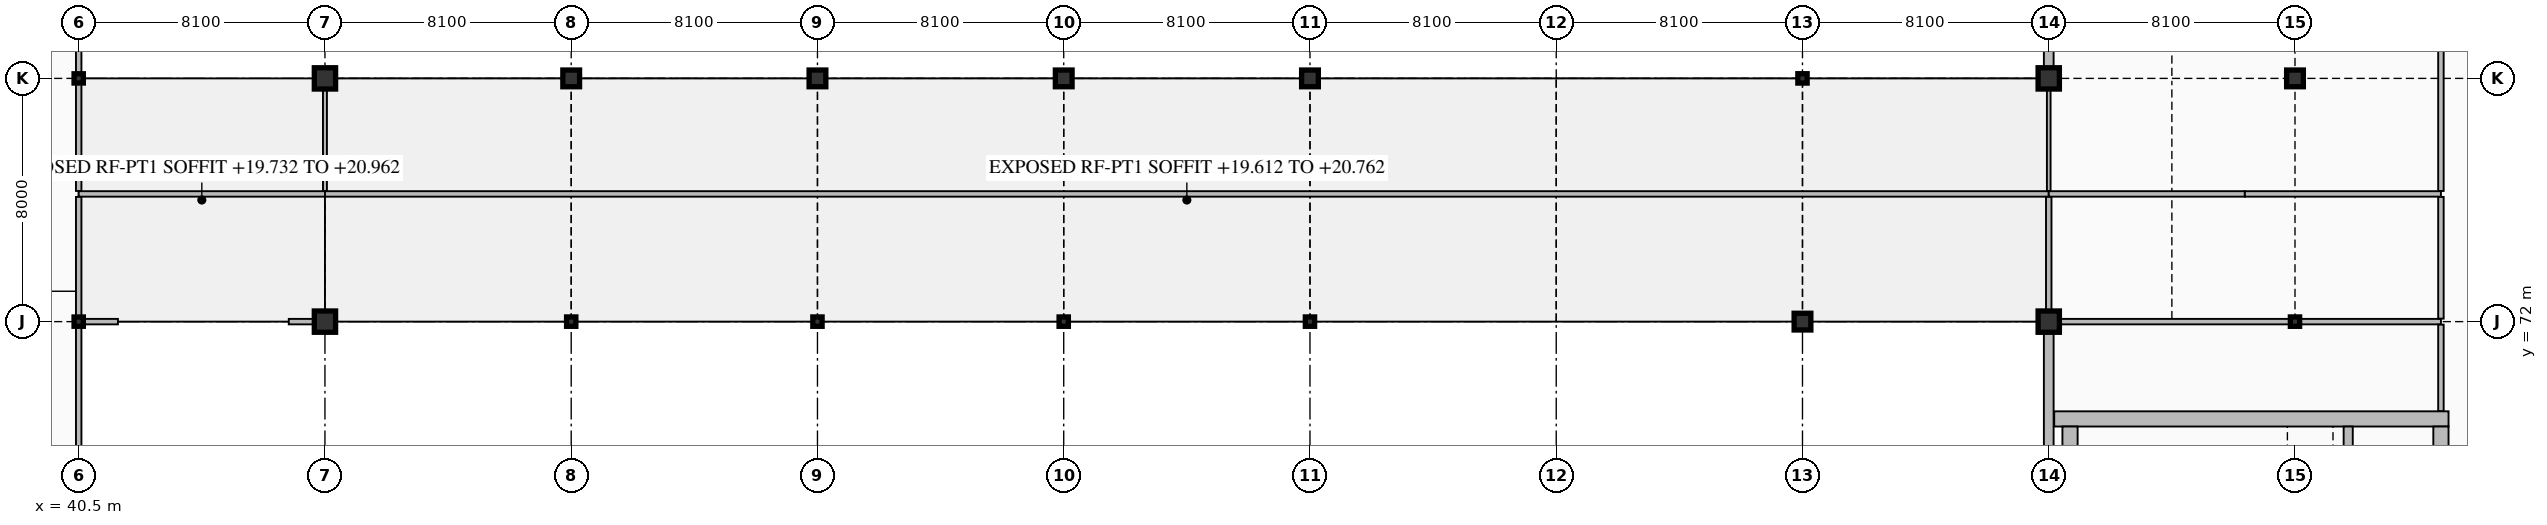
"""IFC4 building model, lengths in metres.
Left out: names, types, materials, properties, quantities, classifications, styles, units other than length and angle.
Written with IfcOpenShell. Run it as: python <this file> out.ifc"""

import sys

from ifc_helpers import new_model, si_unit, direction, frame, frame_2d, origin, origin_2d, place, context, subcontext, project, spatial, rectangle, hollow_rectangle, i_section, extrude, element, fill, save


model = new_model("IFC4")
c1 = context("Model", 3, precision=1e-05, world=origin(), true_north=direction((0.0, 1.0)))
c2 = subcontext(c1, "Body", "Model", "MODEL_VIEW")
j1 = project(units=[si_unit("LENGTHUNIT", "METRE"), si_unit("PLANEANGLEUNIT", "RADIAN")], contexts=[c1])
p1 = place(None, origin())
s1 = spatial("IfcSite", under=j1, at=p1, CompositionType="ELEMENT")
p2 = place(p1, origin())
s2 = spatial("IfcBuilding", under=s1, at=p2, CompositionType="ELEMENT")
p3 = place(p2, frame((0.0, 0.0, 14.7)))
s3 = spatial("IfcBuildingStorey", under=s2, at=p3, CompositionType="ELEMENT", Elevation=14.7)
p4 = place(p3, frame((105.48, 68.8, 0.0), z_axis=(0.0, 0.0, 1.0), x_axis=(1.0, 0.0, 0.0)))
e1 = element("IfcWall", 1, at=p4, inside=s3, PredefinedType="SHEAR", context=c2, shape_type="SweptSolid", body=[
    extrude(rectangle(XDim=12.97, YDim=0.5, at=frame_2d((6.485, 0.0))), origin(), (0.0, 0.0, 1.0), 5.1),
])
for number, where, z_axis, x_axis in (
    (2, (106.0, 60.65, 0.0), (0.0, 0.0, 1.0), (0.0, 1.0, 0.0)),
    (3, (118.2, 60.65, 0.0), (0.0, 0.0, 1.0), (0.0, 1.0, 0.0)),
):
    element("IfcWall", number, at=place(p3, frame(where, z_axis=z_axis, x_axis=x_axis)), inside=s3, PredefinedType="SHEAR", context=c2, shape_type="SweptSolid", body=[
        extrude(rectangle(XDim=7.9, YDim=0.5, at=frame_2d((3.95, 0.0))), origin(), (0.0, 0.0, 1.0), 5.1),
    ])
p5 = place(p3, frame((115.15, 60.65, 0.0), z_axis=(0.0, 0.0, 1.0), x_axis=(0.0, 1.0, 0.0)))
e4 = element("IfcWall", 4, at=p5, inside=s3, PredefinedType="SHEAR", context=c2, shape_type="SweptSolid", body=[
    extrude(rectangle(XDim=7.9, YDim=0.3, at=frame_2d((3.95, 0.0))), origin(), (0.0, 0.0, 1.0), 5.1),
])
for number, where, z_axis, x_axis in (
    (5, (40.5, 72.0, 0.0), (0.0, 0.0, 1.0), (1.0, 0.0, 0.0)),
    (6, (40.5, 80.0, 0.0), (0.0, 0.0, 1.0), (1.0, 0.0, 0.0)),
):
    element("IfcColumn", number, at=place(p3, frame(where, z_axis=z_axis, x_axis=x_axis)), inside=s3, PredefinedType="COLUMN", context=c2, shape_type="SweptSolid", body=[
        extrude(hollow_rectangle(XDim=0.305, YDim=0.305, WallThickness=0.016, InnerFilletRadius=0.016, OuterFilletRadius=0.032, at=origin_2d()), origin(), (0.0, 0.0, 1.0), 5.1),
    ])
for number, where, z_axis, x_axis in (
    (7, (48.6, 72.0, 0.0), (0.0, 0.0, 1.0), (1.0, 0.0, 0.0)),
    (8, (48.6, 80.0, 0.0), (0.0, 0.0, 1.0), (1.0, 0.0, 0.0)),
):
    element("IfcColumn", number, at=place(p3, frame(where, z_axis=z_axis, x_axis=x_axis)), inside=s3, PredefinedType="COLUMN", context=c2, shape_type="SweptSolid", body=[
        extrude(rectangle(XDim=0.7, YDim=0.7, at=origin_2d()), origin(), (0.0, 0.0, 1.0), 4.84),
    ])
p6 = place(p3, frame((56.7, 72.0, 0.0), z_axis=(0.0, 0.0, 1.0), x_axis=(1.0, 0.0, 0.0)))
e9 = element("IfcColumn", 9, at=p6, inside=s3, PredefinedType="COLUMN", context=c2, shape_type="SweptSolid", body=[
    extrude(i_section(OverallWidth=0.305, OverallDepth=0.308, WebThickness=0.01, FlangeThickness=0.015, FilletRadius=0.015, at=origin_2d()), origin(), (0.0, 0.0, 1.0), 4.84),
])
p7 = place(p3, frame((56.7, 80.0, 0.0), z_axis=(0.0, 0.0, 1.0), x_axis=(1.0, 0.0, 0.0)))
e10 = element("IfcColumn", 10, at=p7, inside=s3, PredefinedType="COLUMN", context=c2, shape_type="SweptSolid", body=[
    extrude(rectangle(XDim=0.55, YDim=0.55, at=origin_2d()), origin(), (0.0, 0.0, 1.0), 4.84),
])
p8 = place(p3, frame((64.8, 72.0, 0.0), z_axis=(0.0, 0.0, 1.0), x_axis=(1.0, 0.0, 0.0)))
e11 = element("IfcColumn", 11, at=p8, inside=s3, PredefinedType="COLUMN", context=c2, shape_type="SweptSolid", body=[
    extrude(i_section(OverallWidth=0.305, OverallDepth=0.308, WebThickness=0.01, FlangeThickness=0.015, FilletRadius=0.015, at=origin_2d()), origin(), (0.0, 0.0, 1.0), 4.84),
])
p9 = place(p3, frame((64.8, 80.0, 0.0), z_axis=(0.0, 0.0, 1.0), x_axis=(1.0, 0.0, 0.0)))
e12 = element("IfcColumn", 12, at=p9, inside=s3, PredefinedType="COLUMN", context=c2, shape_type="SweptSolid", body=[
    extrude(rectangle(XDim=0.55, YDim=0.55, at=origin_2d()), origin(), (0.0, 0.0, 1.0), 4.84),
])
p10 = place(p3, frame((72.9, 72.0, 0.0), z_axis=(0.0, 0.0, 1.0), x_axis=(1.0, 0.0, 0.0)))
e13 = element("IfcColumn", 13, at=p10, inside=s3, PredefinedType="COLUMN", context=c2, shape_type="SweptSolid", body=[
    extrude(i_section(OverallWidth=0.305, OverallDepth=0.308, WebThickness=0.01, FlangeThickness=0.015, FilletRadius=0.015, at=origin_2d()), origin(), (0.0, 0.0, 1.0), 4.84),
])
p11 = place(p3, frame((72.9, 80.0, 0.0), z_axis=(0.0, 0.0, 1.0), x_axis=(1.0, 0.0, 0.0)))
e14 = element("IfcColumn", 14, at=p11, inside=s3, PredefinedType="COLUMN", context=c2, shape_type="SweptSolid", body=[
    extrude(rectangle(XDim=0.55, YDim=0.55, at=origin_2d()), origin(), (0.0, 0.0, 1.0), 4.84),
])
p12 = place(p3, frame((81.0, 72.0, 0.0), z_axis=(0.0, 0.0, 1.0), x_axis=(1.0, 0.0, 0.0)))
e15 = element("IfcColumn", 15, at=p12, inside=s3, PredefinedType="COLUMN", context=c2, shape_type="SweptSolid", body=[
    extrude(i_section(OverallWidth=0.305, OverallDepth=0.308, WebThickness=0.01, FlangeThickness=0.015, FilletRadius=0.015, at=origin_2d()), origin(), (0.0, 0.0, 1.0), 4.84),
])
for number, where, z_axis, x_axis in (
    (16, (81.0, 80.0, 0.0), (0.0, 0.0, 1.0), (1.0, 0.0, 0.0)),
    (17, (97.2, 72.0, 0.0), (0.0, 0.0, 1.0), (1.0, 0.0, 0.0)),
):
    element("IfcColumn", number, at=place(p3, frame(where, z_axis=z_axis, x_axis=x_axis)), inside=s3, PredefinedType="COLUMN", context=c2, shape_type="SweptSolid", body=[
        extrude(rectangle(XDim=0.55, YDim=0.55, at=origin_2d()), origin(), (0.0, 0.0, 1.0), 4.84),
    ])
p13 = place(p3, frame((97.2, 80.0, 0.0), z_axis=(0.0, 0.0, 1.0), x_axis=(1.0, 0.0, 0.0)))
e18 = element("IfcColumn", 18, at=p13, inside=s3, PredefinedType="COLUMN", context=c2, shape_type="SweptSolid", body=[
    extrude(i_section(OverallWidth=0.305, OverallDepth=0.308, WebThickness=0.01, FlangeThickness=0.015, FilletRadius=0.015, at=origin_2d()), origin(), (0.0, 0.0, 1.0), 4.84),
])
for number, where, z_axis, x_axis in (
    (19, (105.3, 72.0, 0.0), (0.0, 0.0, 1.0), (1.0, 0.0, 0.0)),
    (20, (105.3, 80.0, 0.0), (0.0, 0.0, 1.0), (1.0, 0.0, 0.0)),
):
    element("IfcColumn", number, at=place(p3, frame(where, z_axis=z_axis, x_axis=x_axis)), inside=s3, PredefinedType="COLUMN", context=c2, shape_type="SweptSolid", body=[
        extrude(rectangle(XDim=0.7, YDim=0.7, at=origin_2d()), origin(), (0.0, 0.0, 1.0), 5.1),
    ])
p14 = place(p3, frame((113.4, 72.0, 0.0), z_axis=(0.0, 0.0, 1.0), x_axis=(1.0, 0.0, 0.0)))
e21 = element("IfcColumn", 21, at=p14, inside=s3, PredefinedType="COLUMN", context=c2, shape_type="SweptSolid", body=[
    extrude(i_section(OverallWidth=0.305, OverallDepth=0.308, WebThickness=0.01, FlangeThickness=0.015, FilletRadius=0.015, at=origin_2d()), origin(), (0.0, 0.0, 1.0), 5.1),
])
p15 = place(p3, frame((113.4, 80.0, 0.0), z_axis=(0.0, 0.0, 1.0), x_axis=(1.0, 0.0, 0.0)))
e22 = element("IfcColumn", 22, at=p15, inside=s3, PredefinedType="COLUMN", context=c2, shape_type="SweptSolid", body=[
    extrude(rectangle(XDim=0.55, YDim=0.55, at=origin_2d()), origin(), (0.0, 0.0, 1.0), 5.1),
])
p16 = place(p3, frame((105.3, 71.82, 0.0), z_axis=(0.0, 0.0, 1.0), x_axis=(0.0, -1.0, 0.0)))
e23 = element("IfcWall", 23, at=p16, inside=s3, PredefinedType="SOLIDWALL", context=c2, shape_type="SweptSolid", body=[
    extrude(rectangle(XDim=15.82, YDim=0.32, at=frame_2d((7.91, 0.0))), origin(), (0.0, 0.0, 1.0), 4.332),
])
p17 = place(p3, frame((105.3, 95.82, 0.0), z_axis=(0.0, 0.0, 1.0), x_axis=(0.0, -1.0, 0.0)))
e24 = element("IfcWall", 24, at=p17, inside=s3, PredefinedType="SOLIDWALL", context=c2, shape_type="SweptSolid", body=[
    extrude(rectangle(XDim=15.64, YDim=0.32, at=frame_2d((7.82, 0.0))), origin(), (0.0, 0.0, 1.0), 4.332),
])
p18 = place(p17, frame((4.95, 0.0, 0.85)))
e25 = element("IfcOpeningElement", 25, at=p18, cuts=e24, PredefinedType="OPENING", context=c2, shape_type="SweptSolid", body=[
    extrude(rectangle(XDim=0.75, YDim=2.2, at=frame_2d((0.375, 1.1))), frame((0.0, 0.17, 0.0), z_axis=(0.0, -1.0, 0.0), x_axis=(1.0, 0.0, 0.0)), (0.0, 0.0, 1.0), 0.34),
])
p19 = place(p3, frame((40.66, 72.0, 0.0), z_axis=(0.0, 0.0, 1.0), x_axis=(1.0, 0.0, 0.0)))
e26 = element("IfcWall", 26, at=p19, inside=s3, PredefinedType="PARTITIONING", context=c2, shape_type="SweptSolid", body=[
    extrude(rectangle(XDim=1.13, YDim=0.18, at=frame_2d((0.565, 0.0))), origin(), (0.0, 0.0, 1.0), 4.84),
])
p20 = place(p3, frame((47.41, 72.0, 0.0), z_axis=(0.0, 0.0, 1.0), x_axis=(1.0, 0.0, 0.0)))
e27 = element("IfcWall", 27, at=p20, inside=s3, PredefinedType="PARTITIONING", context=c2, shape_type="SweptSolid", body=[
    extrude(rectangle(XDim=0.832, YDim=0.18, at=frame_2d((0.416, 0.0))), origin(), (0.0, 0.0, 1.0), 4.84),
])
p21 = place(p3, frame((40.5, 76.2, 0.0), z_axis=(0.0, 0.0, 1.0), x_axis=(1.0, 0.0, 0.0)))
e28 = element("IfcWall", 28, at=p21, inside=s3, PredefinedType="PARTITIONING", context=c2, shape_type="SweptSolid", body=[
    extrude(rectangle(XDim=8.1, YDim=0.18, at=frame_2d((4.05, 0.0))), origin(), (0.0, 0.0, 1.0), 4.84),
])
p22 = place(p3, frame((48.6, 76.2, 0.0), z_axis=(0.0, 0.0, 1.0), x_axis=(1.0, 0.0, 0.0)))
e29 = element("IfcWall", 29, at=p22, inside=s3, PredefinedType="PARTITIONING", context=c2, shape_type="SweptSolid", body=[
    extrude(rectangle(XDim=56.7, YDim=0.18, at=frame_2d((28.35, 0.0))), origin(), (0.0, 0.0, 1.0), 4.84),
])
p23 = place(p22, frame((27.8, 0.0, 0.0)))
e30 = element("IfcOpeningElement", 30, at=p23, cuts=e29, PredefinedType="OPENING", context=c2, shape_type="SweptSolid", body=[
    extrude(rectangle(XDim=1.1, YDim=2.2, at=frame_2d((0.55, 1.1))), frame((0.0, 0.1, 0.0), z_axis=(0.0, -1.0, 0.0), x_axis=(1.0, 0.0, 0.0)), (0.0, 0.0, 1.0), 0.2),
])
p24 = place(p3, frame((105.658, 72.0, 0.0), z_axis=(0.0, 0.0, 1.0), x_axis=(1.0, 0.0, 0.0)))
e31 = element("IfcWall", 31, at=p24, inside=s3, PredefinedType="PARTITIONING", context=c2, shape_type="SweptSolid", body=[
    extrude(rectangle(XDim=7.58, YDim=0.18, at=frame_2d((3.79, 0.0))), origin(), (0.0, 0.0, 1.0), 4.232),
])
p25 = place(p3, frame((113.562, 72.0, 0.0), z_axis=(0.0, 0.0, 1.0), x_axis=(1.0, 0.0, 0.0)))
e32 = element("IfcWall", 32, at=p25, inside=s3, PredefinedType="PARTITIONING", context=c2, shape_type="SweptSolid", body=[
    extrude(rectangle(XDim=4.638, YDim=0.18, at=frame_2d((2.319, 0.0))), origin(), (0.0, 0.0, 1.0), 4.144),
])
for number, where, z_axis, x_axis in (
    (33, (105.3, 76.2, 0.0), (0.0, 0.0, 1.0), (1.0, 0.0, 0.0)),
    (34, (111.75, 76.2, 0.0), (0.0, 0.0, 1.0), (1.0, 0.0, 0.0)),
):
    element("IfcWall", number, at=place(p3, frame(where, z_axis=z_axis, x_axis=x_axis)), inside=s3, PredefinedType="PARTITIONING", context=c2, shape_type="SweptSolid", body=[
        extrude(rectangle(XDim=6.45, YDim=0.18, at=frame_2d((3.225, 0.0))), origin(), (0.0, 0.0, 1.0), 4.84),
    ])
p26 = place(p3, frame((40.5, 64.16, 0.0), z_axis=(0.0, 0.0, 1.0), x_axis=(0.0, 1.0, 0.0)))
e35 = element("IfcWall", 35, at=p26, inside=s3, PredefinedType="PARTITIONING", context=c2, shape_type="SweptSolid", body=[
    extrude(rectangle(XDim=7.679, YDim=0.18, at=frame_2d((3.84, 0.0))), origin(), (0.0, 0.0, 1.0), 4.369),
])
p27 = place(p3, frame((40.5, 72.16, 0.0), z_axis=(0.0, 0.0, 1.0), x_axis=(0.0, 1.0, 0.0)))
e36 = element("IfcWall", 36, at=p27, inside=s3, PredefinedType="PARTITIONING", context=c2, shape_type="SweptSolid", body=[
    extrude(rectangle(XDim=3.942, YDim=0.18, at=frame_2d((1.971, 0.0))), origin(), (0.0, 0.0, 1.0), 4.332),
])
p28 = place(p27, frame((1.486, 0.0, 0.0)))
e37 = element("IfcOpeningElement", 37, at=p28, cuts=e36, PredefinedType="OPENING", context=c2, shape_type="SweptSolid", body=[
    extrude(rectangle(XDim=1.6, YDim=2.35, at=frame_2d((0.8, 1.175))), frame((0.0, 0.1, 0.0), z_axis=(0.0, -1.0, 0.0), x_axis=(1.0, 0.0, 0.0)), (0.0, 0.0, 1.0), 0.2),
])
p29 = place(p3, frame((40.5, 76.298, 0.0), z_axis=(0.0, 0.0, 1.0), x_axis=(0.0, 1.0, 0.0)))
e38 = element("IfcWall", 38, at=p29, inside=s3, PredefinedType="PARTITIONING", context=c2, shape_type="SweptSolid", body=[
    extrude(rectangle(XDim=3.542, YDim=0.18, at=frame_2d((1.771, 0.0))), origin(), (0.0, 0.0, 1.0), 4.332),
])
p30 = place(p3, frame((40.5, 80.16, 0.0), z_axis=(0.0, 0.0, 1.0), x_axis=(0.0, 1.0, 0.0)))
e39 = element("IfcWall", 39, at=p30, inside=s3, PredefinedType="PARTITIONING", context=c2, shape_type="SweptSolid", body=[
    extrude(rectangle(XDim=5.732, YDim=0.18, at=frame_2d((2.866, 0.0))), origin(), (0.0, 0.0, 1.0), 4.369),
])
p31 = place(p3, frame((48.6, 76.298, 0.0), z_axis=(0.0, 0.0, 1.0), x_axis=(0.0, 1.0, 0.0)))
e40 = element("IfcWall", 40, at=p31, inside=s3, PredefinedType="PARTITIONING", context=c2, shape_type="SweptSolid", body=[
    extrude(rectangle(XDim=3.344, YDim=0.13, at=frame_2d((1.672, 0.0))), origin(), (0.0, 0.0, 1.0), 4.84),
])
p32 = place(p3, frame((105.3, 72.358, 0.0), z_axis=(0.0, 0.0, 1.0), x_axis=(0.0, 1.0, 0.0)))
e41 = element("IfcWall", 41, at=p32, inside=s3, PredefinedType="PARTITIONING", context=c2, shape_type="SweptSolid", body=[
    extrude(rectangle(XDim=3.744, YDim=0.18, at=frame_2d((1.872, 0.0))), origin(), (0.0, 0.0, 1.0), 4.369),
])
p33 = place(p32, frame((1.372, 0.0, 0.0)))
e42 = element("IfcOpeningElement", 42, at=p33, cuts=e41, PredefinedType="OPENING", context=c2, shape_type="SweptSolid", body=[
    extrude(rectangle(XDim=1.6, YDim=2.35, at=frame_2d((0.8, 1.175))), frame((0.0, 0.1, 0.0), z_axis=(0.0, -1.0, 0.0), x_axis=(1.0, 0.0, 0.0)), (0.0, 0.0, 1.0), 0.2),
])
p34 = place(p3, frame((105.3, 76.298, 0.0), z_axis=(0.0, 0.0, 1.0), x_axis=(0.0, 1.0, 0.0)))
e43 = element("IfcWall", 43, at=p34, inside=s3, PredefinedType="PARTITIONING", context=c2, shape_type="SweptSolid", body=[
    extrude(rectangle(XDim=3.344, YDim=0.12, at=frame_2d((1.672, 0.0))), origin(), (0.0, 0.0, 1.0), 4.369),
])
p35 = place(p3, frame((118.2, 69.058, 0.0), z_axis=(0.0, 0.0, 1.0), x_axis=(0.0, 1.0, 0.0)))
e44 = element("IfcWall", 44, at=p35, inside=s3, PredefinedType="PARTITIONING", context=c2, shape_type="SweptSolid", body=[
    extrude(rectangle(XDim=2.844, YDim=0.18, at=frame_2d((1.422, 0.0))), origin(), (0.0, 0.0, 1.0), 4.84),
])
p36 = place(p35, frame((0.922, 0.0, 0.0)))
e45 = element("IfcOpeningElement", 45, at=p36, cuts=e44, PredefinedType="OPENING", context=c2, shape_type="SweptSolid", body=[
    extrude(rectangle(XDim=1.0, YDim=2.15, at=frame_2d((0.5, 1.075))), frame((0.0, 0.1, 0.0), z_axis=(0.0, -1.0, 0.0), x_axis=(1.0, 0.0, 0.0)), (0.0, 0.0, 1.0), 0.2),
])
p37 = place(p3, frame((118.2, 72.098, 0.0), z_axis=(0.0, 0.0, 1.0), x_axis=(0.0, 1.0, 0.0)))
e46 = element("IfcWall", 46, at=p37, inside=s3, PredefinedType="PARTITIONING", context=c2, shape_type="SweptSolid", body=[
    extrude(rectangle(XDim=4.004, YDim=0.18, at=frame_2d((2.002, 0.0))), origin(), (0.0, 0.0, 1.0), 4.84),
])
p38 = place(p37, frame((1.402, 0.0, 0.0)))
e47 = element("IfcOpeningElement", 47, at=p38, cuts=e46, PredefinedType="OPENING", context=c2, shape_type="SweptSolid", body=[
    extrude(rectangle(XDim=1.2, YDim=2.2, at=frame_2d((0.6, 1.1))), frame((0.0, 0.1, 0.0), z_axis=(0.0, -1.0, 0.0), x_axis=(1.0, 0.0, 0.0)), (0.0, 0.0, 1.0), 0.2),
])
p39 = place(p3, frame((118.2, 76.298, 0.0), z_axis=(0.0, 0.0, 1.0), x_axis=(0.0, 1.0, 0.0)))
e48 = element("IfcWall", 48, at=p39, inside=s3, PredefinedType="PARTITIONING", context=c2, shape_type="SweptSolid", body=[
    extrude(rectangle(XDim=19.534, YDim=0.18, at=frame_2d((9.767, 0.0))), origin(), (0.0, 0.0, 1.0), 4.84),
])
p40 = place(p39, frame((9.267, 0.0, 0.0)))
e49 = element("IfcOpeningElement", 49, at=p40, cuts=e48, PredefinedType="OPENING", context=c2, shape_type="SweptSolid", body=[
    extrude(rectangle(XDim=1.0, YDim=2.2, at=frame_2d((0.5, 1.1))), frame((0.0, 0.1, 0.0), z_axis=(0.0, -1.0, 0.0), x_axis=(1.0, 0.0, 0.0)), (0.0, 0.0, 1.0), 0.2),
])
p41 = place(p23, origin())
e50 = element("IfcDoor", 50, at=p41, inside=s3, OperationType="SINGLE_SWING_LEFT", PredefinedType="DOOR", context=c2, shape_type="SweptSolid", body=[
    extrude(rectangle(XDim=1.1, YDim=2.2, at=frame_2d((0.55, 1.1))), frame((0.0, 0.025, 0.0), z_axis=(0.0, -1.0, 0.0), x_axis=(1.0, 0.0, 0.0)), (0.0, 0.0, 1.0), 0.05),
])
fill(e30, e50)
p42 = place(p28, frame((1.6, 0.0, 0.0), z_axis=(0.0, 0.0, 1.0), x_axis=(-1.0, 0.0, 0.0)))
e51 = element("IfcDoor", 51, at=p42, inside=s3, OperationType="DOUBLE_DOOR_SINGLE_SWING", PredefinedType="DOOR", context=c2, shape_type="SweptSolid", body=[
    extrude(rectangle(XDim=1.6, YDim=2.35, at=frame_2d((0.8, 1.175))), frame((0.0, 0.025, 0.0), z_axis=(0.0, -1.0, 0.0), x_axis=(1.0, 0.0, 0.0)), (0.0, 0.0, 1.0), 0.05),
])
fill(e37, e51)
p43 = place(p33, origin())
e52 = element("IfcDoor", 52, at=p43, inside=s3, OperationType="DOUBLE_DOOR_SINGLE_SWING", PredefinedType="DOOR", context=c2, shape_type="SweptSolid", body=[
    extrude(rectangle(XDim=1.6, YDim=2.35, at=frame_2d((0.8, 1.175))), frame((0.0, 0.025, 0.0), z_axis=(0.0, -1.0, 0.0), x_axis=(1.0, 0.0, 0.0)), (0.0, 0.0, 1.0), 0.05),
])
fill(e42, e52)
p44 = place(p36, origin())
e53 = element("IfcDoor", 53, at=p44, inside=s3, OperationType="SINGLE_SWING_LEFT", PredefinedType="DOOR", context=c2, shape_type="SweptSolid", body=[
    extrude(rectangle(XDim=1.0, YDim=2.15, at=frame_2d((0.5, 1.075))), frame((0.0, 0.025, 0.0), z_axis=(0.0, -1.0, 0.0), x_axis=(1.0, 0.0, 0.0)), (0.0, 0.0, 1.0), 0.05),
])
fill(e45, e53)
p45 = place(p38, origin())
e54 = element("IfcDoor", 54, at=p45, inside=s3, OperationType="SINGLE_SWING_RIGHT", PredefinedType="DOOR", context=c2, shape_type="SweptSolid", body=[
    extrude(rectangle(XDim=1.2, YDim=2.2, at=frame_2d((0.6, 1.1))), frame((0.0, 0.025, 0.0), z_axis=(0.0, -1.0, 0.0), x_axis=(1.0, 0.0, 0.0)), (0.0, 0.0, 1.0), 0.05),
])
fill(e47, e54)
save(model, sys.argv[1])
